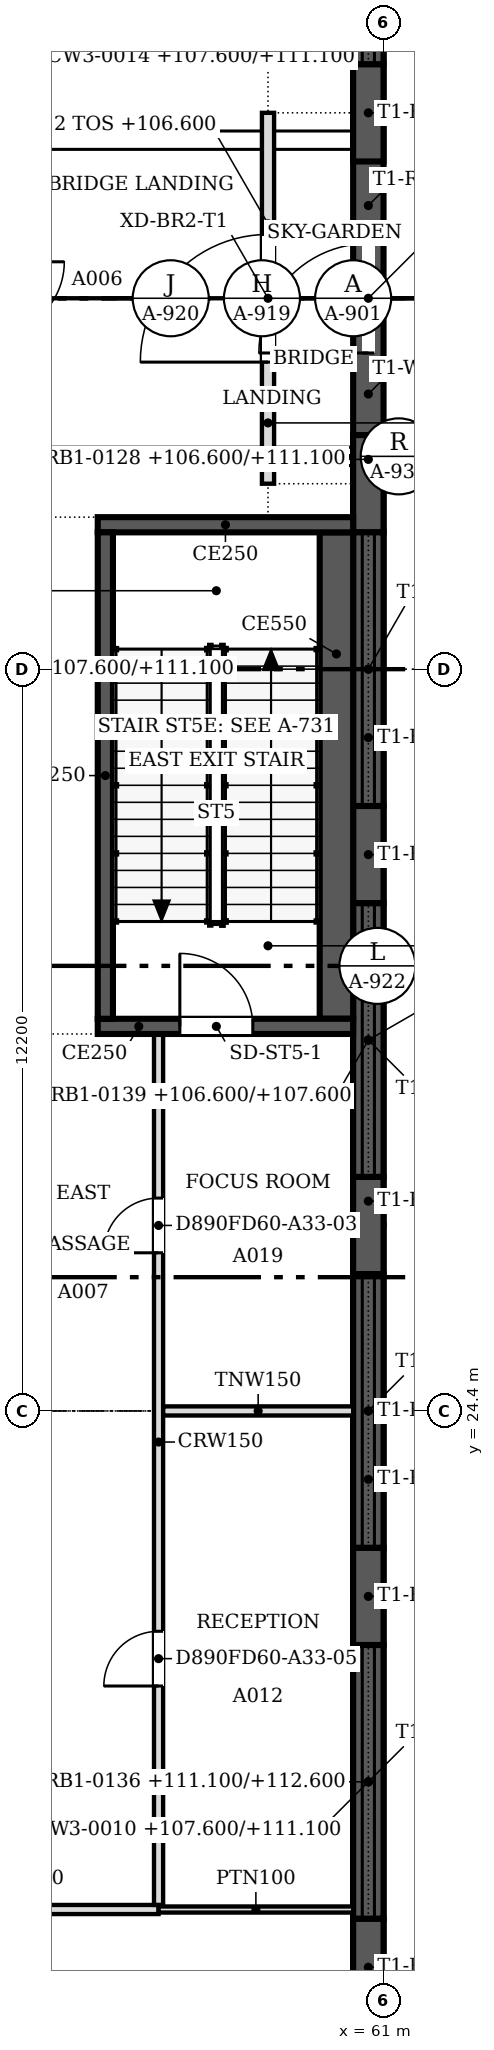
"""IFC4 building model, lengths in metres.
Left out: names, types, materials, properties, quantities, classifications, styles, units other than length and angle.
Written with IfcOpenShell. Run it as: python <this file> out.ifc"""

import sys

from ifc_helpers import new_model, si_unit, direction, frame, frame_2d, origin, place, context, subcontext, project, spatial, polyline, rectangle, outline, extrude, faceted_brep, source, transform, mapped, element, fill, save


model = new_model("IFC4")
c1 = context("Model", 3, precision=1e-05, world=origin(), true_north=direction((0.0, 1.0)))
c2 = subcontext(c1, "Body", "Model", "MODEL_VIEW")
j1 = project(units=[si_unit("LENGTHUNIT", "METRE"), si_unit("PLANEANGLEUNIT", "RADIAN")], contexts=[c1])
p1 = place(None, origin())
s1 = spatial("IfcSite", under=j1, at=p1, CompositionType="ELEMENT")
p2 = place(p1, origin())
s2 = spatial("IfcBuilding", under=s1, at=p2, CompositionType="ELEMENT")
p3 = place(p2, frame((0.0, 0.0, 106.6)))
s3 = spatial("IfcBuildingStorey", under=s2, at=p3, CompositionType="ELEMENT", Elevation=106.6)
m1 = source(origin(), c2, "Body", "SweptSolid", [
    extrude(outline(polyline([(0.0, 0.0), (1.6, 0.0), (1.6, 4.5), (0.0, 4.5), (0.0, 0.0)])), frame((0.0, 0.25, 0.0), z_axis=(0.0, -1.0, 0.0), x_axis=(1.0, 0.0, 0.0)), (0.0, 0.0, 1.0), 0.5),
])
p4 = place(p3, frame((60.75, 14.45, 0.0), z_axis=(0.0, 0.0, 1.0), x_axis=(0.0, 1.0, 0.0)))
e1 = element("IfcWall", 1, at=p4, inside=s3, PredefinedType="SOLIDWALL", context=c2, shape_type="MappedRepresentation", body=[
    mapped(m1, transform((0.0, 0.0, 0.0), scale=1.0)),
])
m2 = source(origin(), c2, "Body", "Brep", [
    faceted_brep([(0.0, -0.25, 0.0), (1.6, -0.25, 0.0), (1.6, -0.25, 4.5), (0.0, -0.25, 4.5), (0.0, 0.25, 4.5), (1.6, 0.25, 4.5), (1.6, 0.25, 0.0), (0.0, 0.25, 0.0)], [[[0, 1, 2, 3]], [[4, 5, 6, 7]], [[7, 6, 1, 0]], [[5, 4, 3, 2]], [[4, 7, 0, 3]], [[1, 6, 5, 2]]]),
])
p5 = place(p3, frame((60.75, 20.55, 0.0), z_axis=(0.0, 0.0, 1.0), x_axis=(0.0, 1.0, 0.0)))
e2 = element("IfcWall", 2, at=p5, inside=s3, PredefinedType="SOLIDWALL", context=c2, shape_type="MappedRepresentation", body=[
    mapped(m2, transform((0.0, 0.0, 0.0), scale=1.0)),
])
for number, where, z_axis, x_axis in (
    (3, (60.75, 26.65, 0.0), (0.0, 0.0, 1.0), (0.0, 1.0, 0.0)),
    (4, (60.75, 32.75, 0.0), (0.0, 0.0, 1.0), (0.0, 1.0, 0.0)),
):
    element("IfcWall", number, at=place(p3, frame(where, z_axis=z_axis, x_axis=x_axis)), inside=s3, PredefinedType="SOLIDWALL", context=c2, shape_type="MappedRepresentation", body=[
        mapped(m1, transform((0.0, 0.0, 0.0), scale=1.0)),
    ])
p6 = place(p3, frame((60.75, 38.85, 0.0), z_axis=(0.0, 0.0, 1.0), x_axis=(0.0, 1.0, 0.0)))
e5 = element("IfcWall", 5, at=p6, inside=s3, PredefinedType="SOLIDWALL", context=c2, shape_type="MappedRepresentation", body=[
    mapped(m2, transform((0.0, 0.0, 0.0), scale=1.0)),
])
p7 = place(p3, frame((60.75, 44.95, 0.0), z_axis=(0.0, 0.0, 1.0), x_axis=(0.0, 1.0, 0.0)))
e6 = element("IfcWall", 6, at=p7, inside=s3, PredefinedType="SOLIDWALL", context=c2, shape_type="MappedRepresentation", body=[
    mapped(m1, transform((0.0, 0.0, 0.0), scale=1.0)),
])
m3 = source(origin(), c2, "Body", "SweptSolid", [
    extrude(outline(polyline([(0.0, 0.0), (6.1, 0.0), (6.1, 1.5), (0.0, 1.5), (0.0, 0.0)])), frame((0.0, 0.25, 0.0), z_axis=(0.0, -1.0, 0.0), x_axis=(1.0, 0.0, 0.0)), (0.0, 0.0, 1.0), 0.5),
])
p8 = place(p3, frame((60.75, 9.15, 4.5), z_axis=(0.0, 0.0, 1.0), x_axis=(0.0, 1.0, 0.0)))
e7 = element("IfcWall", 7, at=p8, inside=s3, PredefinedType="SOLIDWALL", context=c2, shape_type="MappedRepresentation", body=[
    mapped(m3, transform((0.0, 0.0, 0.0), scale=1.0)),
])
m4 = source(origin(), c2, "Body", "SweptSolid", [
    extrude(outline(polyline([(0.0, 0.0), (4.5, 0.0), (4.5, 1.0), (0.0, 1.0), (0.0, 0.0)])), frame((0.0, 0.25, 0.0), z_axis=(0.0, -1.0, 0.0), x_axis=(1.0, 0.0, 0.0)), (0.0, 0.0, 1.0), 0.5),
])
p9 = place(p3, frame((60.75, 16.05, 0.0), z_axis=(0.0, 0.0, 1.0), x_axis=(0.0, 1.0, 0.0)))
e8 = element("IfcWall", 8, at=p9, inside=s3, PredefinedType="SOLIDWALL", context=c2, shape_type="MappedRepresentation", body=[
    mapped(m4, transform((0.0, 0.0, 0.0), scale=1.0)),
])
p10 = place(p3, frame((60.75, 15.25, 4.5), z_axis=(0.0, 0.0, 1.0), x_axis=(0.0, 1.0, 0.0)))
e9 = element("IfcWall", 9, at=p10, inside=s3, PredefinedType="SOLIDWALL", context=c2, shape_type="MappedRepresentation", body=[
    mapped(m3, transform((0.0, 0.0, 0.0), scale=1.0)),
])
p11 = place(p3, frame((60.75, 22.15, 0.0), z_axis=(0.0, 0.0, 1.0), x_axis=(0.0, 1.0, 0.0)))
e10 = element("IfcWall", 10, at=p11, inside=s3, PredefinedType="SOLIDWALL", context=c2, shape_type="MappedRepresentation", body=[
    mapped(m4, transform((0.0, 0.0, 0.0), scale=1.0)),
])
m5 = source(origin(), c2, "Body", "Brep", [
    faceted_brep([(0.0, -0.25, 0.0), (6.1, -0.25, 0.0), (6.1, -0.25, 1.5), (0.0, -0.25, 1.5), (0.0, 0.25, 1.5), (6.1, 0.25, 1.5), (6.1, 0.25, 0.0), (0.0, 0.25, 0.0)], [[[0, 1, 2, 3]], [[4, 5, 6, 7]], [[7, 6, 1, 0]], [[5, 4, 3, 2]], [[4, 7, 0, 3]], [[1, 6, 5, 2]]]),
])
p12 = place(p3, frame((60.75, 21.35, 4.5), z_axis=(0.0, 0.0, 1.0), x_axis=(0.0, 1.0, 0.0)))
e11 = element("IfcWall", 11, at=p12, inside=s3, PredefinedType="SOLIDWALL", context=c2, shape_type="MappedRepresentation", body=[
    mapped(m5, transform((0.0, 0.0, 0.0), scale=1.0)),
])
p13 = place(p3, frame((60.75, 28.25, 0.0), z_axis=(0.0, 0.0, 1.0), x_axis=(0.0, 1.0, 0.0)))
e12 = element("IfcWall", 12, at=p13, inside=s3, PredefinedType="SOLIDWALL", context=c2, shape_type="MappedRepresentation", body=[
    mapped(m4, transform((0.0, 0.0, 0.0), scale=1.0)),
])
p14 = place(p3, frame((60.75, 27.45, 4.5), z_axis=(0.0, 0.0, 1.0), x_axis=(0.0, 1.0, 0.0)))
e13 = element("IfcWall", 13, at=p14, inside=s3, PredefinedType="SOLIDWALL", context=c2, shape_type="MappedRepresentation", body=[
    mapped(m3, transform((0.0, 0.0, 0.0), scale=1.0)),
])
p15 = place(p3, frame((60.75, 34.35, 0.0), z_axis=(0.0, 0.0, 1.0), x_axis=(0.0, 1.0, 0.0)))
e14 = element("IfcWall", 14, at=p15, inside=s3, PredefinedType="SOLIDWALL", context=c2, shape_type="MappedRepresentation", body=[
    mapped(m4, transform((0.0, 0.0, 0.0), scale=1.0)),
])
p16 = place(p3, frame((60.75, 33.55, 4.5), z_axis=(0.0, 0.0, 1.0), x_axis=(0.0, 1.0, 0.0)))
e15 = element("IfcWall", 15, at=p16, inside=s3, PredefinedType="SOLIDWALL", context=c2, shape_type="MappedRepresentation", body=[
    mapped(m5, transform((0.0, 0.0, 0.0), scale=1.0)),
])
p17 = place(p3, frame((60.75, 39.65, 4.5), z_axis=(0.0, 0.0, 1.0), x_axis=(0.0, 1.0, 0.0)))
e16 = element("IfcWall", 16, at=p17, inside=s3, PredefinedType="SOLIDWALL", context=c2, shape_type="MappedRepresentation", body=[
    mapped(m3, transform((0.0, 0.0, 0.0), scale=1.0)),
])
m6 = source(origin(), c2, "Body", "Brep", [
    faceted_brep([(0.0, -0.25, 0.0), (1.403, -0.25, 0.0), (1.403, -0.25, 1.0), (0.0, -0.25, 1.0), (0.0, 0.25, 1.0), (1.403, 0.25, 1.0), (1.403, 0.25, 0.0), (0.0, 0.25, 0.0)], [[[0, 1, 2, 3]], [[4, 5, 6, 7]], [[7, 6, 1, 0]], [[5, 4, 3, 2]], [[4, 7, 0, 3]], [[1, 6, 5, 2]]]),
])
p18 = place(p3, frame((60.75, 46.55, 0.0), z_axis=(0.0, 0.0, 1.0), x_axis=(0.0, 1.0, 0.0)))
e17 = element("IfcWall", 17, at=p18, inside=s3, PredefinedType="SOLIDWALL", context=c2, shape_type="MappedRepresentation", body=[
    mapped(m6, transform((0.0, 0.0, 0.0), scale=1.0)),
])
m7 = source(origin(), c2, "Body", "Brep", [
    faceted_brep([(0.0, -0.25, 0.0), (3.003, -0.25, 0.0), (3.003, -0.25, 1.5), (0.0, -0.25, 1.5), (0.0, 0.25, 1.5), (2.957, 0.25, 1.5), (2.957, 0.25, 0.0), (0.0, 0.25, 0.0), (3.003, 0.0, 0.0), (3.003, 0.0, 1.5)], [[[0, 1, 2, 3]], [[4, 5, 6, 7]], [[7, 6, 8, 1, 0]], [[9, 2, 1, 8]], [[5, 4, 3, 2, 9]], [[4, 7, 0, 3]], [[8, 6, 5, 9]]]),
])
p19 = place(p3, frame((60.75, 45.75, 4.5), z_axis=(0.0, 0.0, 1.0), x_axis=(0.0, 1.0, 0.0)))
e18 = element("IfcWall", 18, at=p19, inside=s3, PredefinedType="SOLIDWALL", context=c2, shape_type="MappedRepresentation", body=[
    mapped(m7, transform((0.0, 0.0, 0.0), scale=1.0)),
])
p20 = place(p3, frame((60.75, 40.45, 0.0), z_axis=(0.0, 0.0, 1.0), x_axis=(0.0, 1.0, 0.0)))
e19 = element("IfcWall", 19, at=p20, inside=s3, PredefinedType="PARTITIONING", context=c2, shape_type="SweptSolid", body=[
    extrude(rectangle(XDim=4.5, YDim=0.2, at=frame_2d((2.25, 0.0))), origin(), (0.0, 0.0, 1.0), 4.5),
])
m8 = source(origin(), c2, "Body", "SweptSolid", [
    extrude(rectangle(XDim=1.8, YDim=2.7, at=frame_2d((0.9, 1.35))), frame((0.0, 0.11, 0.0), z_axis=(0.0, -1.0, 0.0), x_axis=(1.0, 0.0, 0.0)), (0.0, 0.0, 1.0), 0.22),
])
p21 = place(p20, frame((1.35, 0.0, 0.0)))
e20 = element("IfcOpeningElement", 20, at=p21, cuts=e19, PredefinedType="OPENING", context=c2, shape_type="MappedRepresentation", body=[
    mapped(m8, transform((0.0, 0.0, 0.0), scale=1.0)),
])
m9 = source(origin(), c2, "Body", "SweptSolid", [
    extrude(outline(polyline([(0.12, 0.1), (1.23, 0.1), (1.23, 4.4), (0.12, 4.4), (0.12, 0.1)])), frame((0.0, 0.11, 0.0), z_axis=(0.0, -1.0, 0.0), x_axis=(1.0, 0.0, 0.0)), (0.0, 0.0, 1.0), 0.22),
])
p22 = place(p20, origin())
e21 = element("IfcOpeningElement", 21, at=p22, cuts=e19, PredefinedType="OPENING", context=c2, shape_type="MappedRepresentation", body=[
    mapped(m9, transform((0.0, 0.0, 0.0), scale=1.0)),
])
m10 = source(origin(), c2, "Body", "SweptSolid", [
    extrude(outline(polyline([(3.27, 0.1), (4.38, 0.1), (4.38, 4.4), (3.27, 4.4), (3.27, 0.1)])), frame((0.0, 0.11, 0.0), z_axis=(0.0, -1.0, 0.0), x_axis=(1.0, 0.0, 0.0)), (0.0, 0.0, 1.0), 0.22),
])
p23 = place(p20, origin())
e22 = element("IfcOpeningElement", 22, at=p23, cuts=e19, PredefinedType="OPENING", context=c2, shape_type="MappedRepresentation", body=[
    mapped(m10, transform((0.0, 0.0, 0.0), scale=1.0)),
])
m11 = source(origin(), c2, "Body", "SweptSolid", [
    extrude(outline(polyline([(1.35, 2.82), (3.15, 2.82), (3.15, 4.4), (1.35, 4.4), (1.35, 2.82)])), frame((0.0, 0.11, 0.0), z_axis=(0.0, -1.0, 0.0), x_axis=(1.0, 0.0, 0.0)), (0.0, 0.0, 1.0), 0.22),
])
p24 = place(p20, origin())
e23 = element("IfcOpeningElement", 23, at=p24, cuts=e19, PredefinedType="OPENING", context=c2, shape_type="MappedRepresentation", body=[
    mapped(m11, transform((0.0, 0.0, 0.0), scale=1.0)),
])
p25 = place(p3, frame((60.5, 30.725, 0.0), z_axis=(0.0, 0.0, 1.0), x_axis=(-1.0, 0.0, 0.0)))
e24 = element("IfcWall", 24, at=p25, inside=s3, PredefinedType="SOLIDWALL", context=c2, shape_type="SweptSolid", body=[
    extrude(rectangle(XDim=4.2, YDim=0.25, at=frame_2d((2.1, 0.0))), origin(), (0.0, 0.0, 1.0), 6.0),
])
m12 = source(origin(), c2, "Body", "SweptSolid", [
    extrude(rectangle(XDim=1.2, YDim=2.1, at=frame_2d((0.6, 1.05))), frame((0.0, 0.135, 0.0), z_axis=(0.0, -1.0, 0.0), x_axis=(1.0, 0.0, 0.0)), (0.0, 0.0, 1.0), 0.27),
])
p26 = place(p25, frame((1.65, 0.0, 0.0)))
e25 = element("IfcOpeningElement", 25, at=p26, cuts=e24, PredefinedType="OPENING", context=c2, shape_type="MappedRepresentation", body=[
    mapped(m12, transform((0.0, 0.0, 0.0), scale=1.0)),
])
p27 = place(p3, frame((56.425, 30.85, 0.0), z_axis=(0.0, 0.0, 1.0), x_axis=(0.0, 1.0, 0.0)))
e26 = element("IfcWall", 26, at=p27, inside=s3, PredefinedType="SOLIDWALL", context=c2, shape_type="SweptSolid", body=[
    extrude(rectangle(XDim=8.0, YDim=0.25, at=frame_2d((4.0, 0.0))), origin(), (0.0, 0.0, 1.0), 6.0),
])
p28 = place(p3, frame((56.3, 38.975, 0.0), z_axis=(0.0, 0.0, 1.0), x_axis=(1.0, 0.0, 0.0)))
e27 = element("IfcWall", 27, at=p28, inside=s3, PredefinedType="SOLIDWALL", context=c2, shape_type="SweptSolid", body=[
    extrude(rectangle(XDim=4.2, YDim=0.25, at=frame_2d((2.1, 0.0))), origin(), (0.0, 0.0, 1.0), 6.0),
])
p29 = place(p3, frame((60.225, 38.85, 0.0), z_axis=(0.0, 0.0, 1.0), x_axis=(0.0, -1.0, 0.0)))
e28 = element("IfcWall", 28, at=p29, inside=s3, PredefinedType="SOLIDWALL", context=c2, shape_type="SweptSolid", body=[
    extrude(rectangle(XDim=8.0, YDim=0.55, at=frame_2d((4.0, 0.0))), origin(), (0.0, 0.0, 1.0), 6.0),
])
p30 = place(p3, frame((59.1, 39.65, 0.0), z_axis=(0.0, 0.0, 1.0), x_axis=(0.0, 1.0, 0.0)))
e29 = element("IfcWall", 29, at=p30, inside=s3, PredefinedType="PARTITIONING", context=c2, shape_type="SweptSolid", body=[
    extrude(rectangle(XDim=6.1, YDim=0.2, at=frame_2d((3.05, 0.0))), origin(), (0.0, 0.0, 1.0), 5.267),
])
m13 = source(origin(), c2, "Body", "SweptSolid", [
    extrude(rectangle(XDim=2.1, YDim=2.1, at=frame_2d((1.05, 1.05))), frame((0.0, 0.11, 0.0), z_axis=(0.0, -1.0, 0.0), x_axis=(1.0, 0.0, 0.0)), (0.0, 0.0, 1.0), 0.22),
])
p31 = place(p30, frame((2.0, 0.0, 0.0)))
e30 = element("IfcOpeningElement", 30, at=p31, cuts=e29, PredefinedType="OPENING", context=c2, shape_type="MappedRepresentation", body=[
    mapped(m13, transform((0.0, 0.0, 0.0), scale=1.0)),
])
p32 = place(p3, frame((57.3, 16.2, 0.0), z_axis=(0.0, 0.0, 1.0), x_axis=(-1.0, 0.0, 0.0)))
e31 = element("IfcWall", 31, at=p32, inside=s3, PredefinedType="PARTITIONING", context=c2, shape_type="SweptSolid", body=[
    extrude(rectangle(XDim=10.824, YDim=0.15, at=frame_2d((5.412, 0.0))), origin(), (0.0, 0.0, 1.0), 5.167),
])
m14 = source(origin(), c2, "Body", "SweptSolid", [
    extrude(rectangle(XDim=1.8, YDim=2.1, at=frame_2d((0.9, 1.05))), frame((0.0, 0.085, 0.0), z_axis=(0.0, -1.0, 0.0), x_axis=(1.0, 0.0, 0.0)), (0.0, 0.0, 1.0), 0.17),
])
p33 = place(p32, frame((4.524, 0.0, 0.0)))
e32 = element("IfcOpeningElement", 32, at=p33, cuts=e31, PredefinedType="OPENING", context=c2, shape_type="MappedRepresentation", body=[
    mapped(m14, transform((0.0, 0.0, 0.0), scale=1.0)),
])
p34 = place(p3, frame((57.301, 16.2, 0.0), z_axis=(0.0, 0.0, 1.0), x_axis=(1.0, 0.0, 0.0)))
e33 = element("IfcWall", 33, at=p34, inside=s3, PredefinedType="PARTITIONING", context=c2, shape_type="SweptSolid", body=[
    extrude(rectangle(XDim=3.199, YDim=0.1, at=frame_2d((1.6, 0.0))), origin(), (0.0, 0.0, 1.0), 5.167),
])
p35 = place(p3, frame((57.3, 30.6, 0.0), z_axis=(0.0, 0.0, 1.0), x_axis=(0.0, -1.0, 0.0)))
e34 = element("IfcWall", 34, at=p35, inside=s3, PredefinedType="PARTITIONING", context=c2, shape_type="SweptSolid", body=[
    extrude(rectangle(XDim=14.324, YDim=0.15, at=frame_2d((7.162, 0.0))), origin(), (0.0, 0.0, 1.0), 5.167),
])
m15 = source(origin(), c2, "Body", "SweptSolid", [
    extrude(rectangle(XDim=0.9, YDim=2.1, at=frame_2d((0.45, 1.05))), frame((0.0, 0.085, 0.0), z_axis=(0.0, -1.0, 0.0), x_axis=(1.0, 0.0, 0.0)), (0.0, 0.0, 1.0), 0.17),
])
p36 = place(p35, frame((2.699, 0.0, 0.0)))
e35 = element("IfcOpeningElement", 35, at=p36, cuts=e34, PredefinedType="OPENING", context=c2, shape_type="MappedRepresentation", body=[
    mapped(m15, transform((0.0, 0.0, 0.0), scale=1.0)),
])
p37 = place(p35, frame((9.824, 0.0, 0.0)))
e36 = element("IfcOpeningElement", 36, at=p37, cuts=e34, PredefinedType="OPENING", context=c2, shape_type="MappedRepresentation", body=[
    mapped(m15, transform((0.0, 0.0, 0.0), scale=1.0)),
])
p38 = place(p3, frame((57.376, 24.4, 0.0), z_axis=(0.0, 0.0, 1.0), x_axis=(1.0, 0.0, 0.0)))
e37 = element("IfcWall", 37, at=p38, inside=s3, PredefinedType="PARTITIONING", context=c2, shape_type="SweptSolid", body=[
    extrude(rectangle(XDim=3.124, YDim=0.15, at=frame_2d((1.562, 0.0))), origin(), (0.0, 0.0, 1.0), 5.167),
])
m16 = source(origin(), c2, "Body", "SweptSolid", [
    extrude(rectangle(XDim=1.8, YDim=2.7, at=frame_2d((0.9, 1.35))), frame((0.0, 0.03, 0.0), z_axis=(0.0, -1.0, 0.0), x_axis=(1.0, 0.0, 0.0)), (0.0, 0.0, 1.0), 0.06),
])
p39 = place(p21, origin())
e38 = element("IfcDoor", 38, at=p39, inside=s3, OperationType="DOUBLE_DOOR_SINGLE_SWING", PredefinedType="DOOR", context=c2, shape_type="MappedRepresentation", body=[
    mapped(m16, transform((0.0, 0.0, 0.0), scale=1.0)),
])
fill(e20, e38)
m17 = source(origin(), c2, "Body", "SweptSolid", [
    extrude(rectangle(XDim=1.2, YDim=2.1, at=frame_2d((0.6, 1.05))), frame((0.0, 0.025, 0.0), z_axis=(0.0, -1.0, 0.0), x_axis=(1.0, 0.0, 0.0)), (0.0, 0.0, 1.0), 0.05),
])
p40 = place(p26, origin())
e39 = element("IfcDoor", 39, at=p40, inside=s3, OperationType="SINGLE_SWING_RIGHT", PredefinedType="DOOR", context=c2, shape_type="MappedRepresentation", body=[
    mapped(m17, transform((0.0, 0.0, 0.0), scale=1.0)),
])
fill(e25, e39)
m18 = source(origin(), c2, "Body", "SweptSolid", [
    extrude(rectangle(XDim=2.1, YDim=2.1, at=frame_2d((1.05, 1.05))), frame((0.0, 0.025, 0.0), z_axis=(0.0, -1.0, 0.0), x_axis=(1.0, 0.0, 0.0)), (0.0, 0.0, 1.0), 0.05),
])
p41 = place(p31, origin())
e40 = element("IfcDoor", 40, at=p41, inside=s3, OperationType="DOUBLE_DOOR_SINGLE_SWING", PredefinedType="DOOR", context=c2, shape_type="MappedRepresentation", body=[
    mapped(m18, transform((0.0, 0.0, 0.0), scale=1.0)),
])
fill(e30, e40)
m19 = source(origin(), c2, "Body", "SweptSolid", [
    extrude(rectangle(XDim=0.9, YDim=2.1, at=frame_2d((0.45, 1.05))), frame((0.0, 0.025, 0.0), z_axis=(0.0, -1.0, 0.0), x_axis=(1.0, 0.0, 0.0)), (0.0, 0.0, 1.0), 0.05),
])
p42 = place(p36, origin())
e41 = element("IfcDoor", 41, at=p42, inside=s3, OperationType="SINGLE_SWING_RIGHT", PredefinedType="DOOR", context=c2, shape_type="MappedRepresentation", body=[
    mapped(m19, transform((0.0, 0.0, 0.0), scale=1.0)),
])
fill(e35, e41)
p43 = place(p37, origin())
e42 = element("IfcDoor", 42, at=p43, inside=s3, OperationType="SINGLE_SWING_RIGHT", PredefinedType="DOOR", context=c2, shape_type="MappedRepresentation", body=[
    mapped(m19, transform((0.0, 0.0, 0.0), scale=1.0)),
])
fill(e36, e42)
save(model, sys.argv[1])
